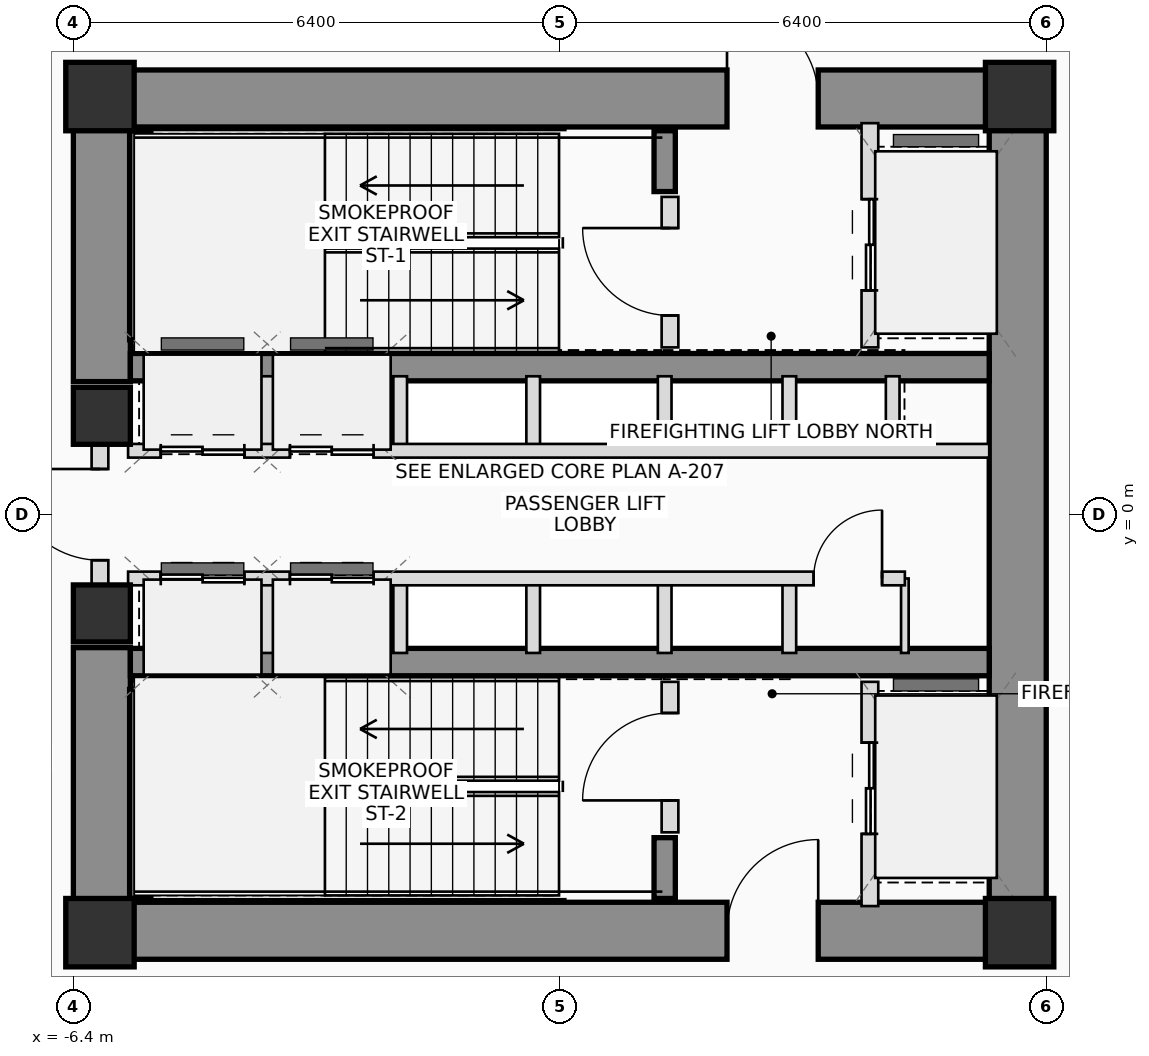
"""IFC4 building model, lengths in metres.
Left out: names, types, materials, properties, quantities, classifications, styles, units other than length and angle.
Written with IfcOpenShell. Run it as: python <this file> out.ifc"""

import sys

from ifc_helpers import new_model, si_unit, direction, frame, frame_2d, origin, origin_2d, place, context, subcontext, project, spatial, rectangle, extrude, source, transform, mapped, element, fill, save


model = new_model("IFC4")
c1 = context("Model", 3, precision=1e-05, world=origin(), true_north=direction((0.0, 1.0)))
c2 = subcontext(c1, "Body", "Model", "MODEL_VIEW")
j1 = project(units=[si_unit("LENGTHUNIT", "METRE"), si_unit("PLANEANGLEUNIT", "RADIAN")], contexts=[c1])
p1 = place(None, origin())
s1 = spatial("IfcSite", under=j1, at=p1, CompositionType="ELEMENT")
p2 = place(p1, origin())
s2 = spatial("IfcBuilding", under=s1, at=p2, CompositionType="ELEMENT")
p3 = place(p2, frame((0.0, 0.0, 73.55)))
s3 = spatial("IfcBuildingStorey", under=s2, at=p3, CompositionType="ELEMENT", Elevation=73.55)
m1 = source(origin(), c2, "Body", "SweptSolid", [
    extrude(rectangle(XDim=0.9, YDim=0.9, at=origin_2d()), origin(), (0.0, 0.0, 1.0), 3.75),
])
for number, where, z_axis, x_axis in (
    (1, (-6.05, -5.5, 0.0), (0.0, 0.0, 1.0), (1.0, 0.0, 0.0)),
    (2, (6.05, -5.5, 0.0), (0.0, 0.0, 1.0), (1.0, 0.0, 0.0)),
    (3, (6.05, 5.5, 0.0), (0.0, 0.0, 1.0), (1.0, 0.0, 0.0)),
    (4, (-6.05, 5.5, 0.0), (0.0, 0.0, 1.0), (1.0, 0.0, 0.0)),
):
    element("IfcColumn", number, at=place(p3, frame(where, z_axis=z_axis, x_axis=x_axis)), inside=s3, PredefinedType="COLUMN", context=c2, shape_type="MappedRepresentation", body=[
        mapped(m1, transform((0.0, 0.0, 0.0), scale=1.0)),
    ])
p4 = place(p3, frame((-6.4, 5.475, 0.0), z_axis=(0.0, 0.0, 1.0), x_axis=(1.0, 0.0, 0.0)))
e5 = element("IfcWall", 5, at=p4, inside=s3, PredefinedType="SHEAR", context=c2, shape_type="SweptSolid", body=[
    extrude(rectangle(XDim=12.8, YDim=0.75, at=frame_2d((6.4, 0.0))), origin(), (0.0, 0.0, 1.0), 3.75),
])
p5 = place(p4, frame((8.6, 0.0, 0.0)))
e6 = element("IfcOpeningElement", 6, at=p5, cuts=e5, PredefinedType="OPENING", context=c2, shape_type="SweptSolid", body=[
    extrude(rectangle(XDim=1.2, YDim=2.2, at=frame_2d((0.6, 1.1))), frame((0.0, 0.385, 0.0), z_axis=(0.0, -1.0, 0.0), x_axis=(1.0, 0.0, 0.0)), (0.0, 0.0, 1.0), 0.77),
])
p6 = place(p3, frame((-6.4, -5.475, 0.0), z_axis=(0.0, 0.0, 1.0), x_axis=(1.0, 0.0, 0.0)))
e7 = element("IfcWall", 7, at=p6, inside=s3, PredefinedType="SHEAR", context=c2, shape_type="SweptSolid", body=[
    extrude(rectangle(XDim=12.8, YDim=0.75, at=frame_2d((6.4, 0.0))), origin(), (0.0, 0.0, 1.0), 3.75),
])
p7 = place(p6, frame((8.6, 0.0, 0.0)))
e8 = element("IfcOpeningElement", 8, at=p7, cuts=e7, PredefinedType="OPENING", context=c2, shape_type="SweptSolid", body=[
    extrude(rectangle(XDim=1.2, YDim=2.2, at=frame_2d((0.6, 1.1))), frame((0.0, 0.385, 0.0), z_axis=(0.0, -1.0, 0.0), x_axis=(1.0, 0.0, 0.0)), (0.0, 0.0, 1.0), 0.77),
])
p8 = place(p3, frame((6.025, -5.1, 0.0), z_axis=(0.0, 0.0, 1.0), x_axis=(0.0, 1.0, 0.0)))
e9 = element("IfcWall", 9, at=p8, inside=s3, PredefinedType="SHEAR", context=c2, shape_type="SweptSolid", body=[
    extrude(rectangle(XDim=10.2, YDim=0.75, at=frame_2d((5.1, 0.0))), origin(), (0.0, 0.0, 1.0), 3.75),
])
for number, where, z_axis, x_axis in (
    (10, (-6.025, -5.1, 0.0), (0.0, 0.0, 1.0), (0.0, 1.0, 0.0)),
    (11, (-6.025, 1.75, 0.0), (0.0, 0.0, 1.0), (0.0, 1.0, 0.0)),
):
    element("IfcWall", number, at=place(p3, frame(where, z_axis=z_axis, x_axis=x_axis)), inside=s3, PredefinedType="SHEAR", context=c2, shape_type="SweptSolid", body=[
        extrude(rectangle(XDim=3.35, YDim=0.75, at=frame_2d((1.675, 0.0))), origin(), (0.0, 0.0, 1.0), 3.75),
    ])
for number, where, z_axis, x_axis in (
    (12, (-5.65, 1.94, 0.0), (0.0, 0.0, 1.0), (1.0, 0.0, 0.0)),
    (13, (-5.65, -1.94, 0.0), (0.0, 0.0, 1.0), (1.0, 0.0, 0.0)),
):
    element("IfcWall", number, at=place(p3, frame(where, z_axis=z_axis, x_axis=x_axis)), inside=s3, PredefinedType="SHEAR", context=c2, shape_type="SweptSolid", body=[
        extrude(rectangle(XDim=11.3, YDim=0.36, at=frame_2d((5.65, 0.0))), origin(), (0.0, 0.0, 1.0), 3.75),
    ])
p9 = place(p3, frame((-5.52, 2.3, 0.0), z_axis=(0.0, 0.0, 1.0), x_axis=(0.0, 1.0, 0.0)))
e14 = element("IfcWall", 14, at=p9, inside=s3, PredefinedType="SHEAR", context=c2, shape_type="SweptSolid", body=[
    extrude(rectangle(XDim=2.75, YDim=0.28, at=frame_2d((1.375, 0.0))), origin(), (0.0, 0.0, 1.0), 3.75),
])
p10 = place(p3, frame((1.38, 4.25, 0.0), z_axis=(0.0, 0.0, 1.0), x_axis=(0.0, 1.0, 0.0)))
e15 = element("IfcWall", 15, at=p10, inside=s3, PredefinedType="SHEAR", context=c2, shape_type="SweptSolid", body=[
    extrude(rectangle(XDim=0.8, YDim=0.28, at=frame_2d((0.4, 0.0))), origin(), (0.0, 0.0, 1.0), 3.75),
])
p11 = place(p3, frame((-5.52, -5.05, 0.0), z_axis=(0.0, 0.0, 1.0), x_axis=(0.0, 1.0, 0.0)))
e16 = element("IfcWall", 16, at=p11, inside=s3, PredefinedType="SHEAR", context=c2, shape_type="SweptSolid", body=[
    extrude(rectangle(XDim=2.75, YDim=0.28, at=frame_2d((1.375, 0.0))), origin(), (0.0, 0.0, 1.0), 3.75),
])
p12 = place(p3, frame((1.38, -5.05, 0.0), z_axis=(0.0, 0.0, 1.0), x_axis=(0.0, 1.0, 0.0)))
e17 = element("IfcWall", 17, at=p12, inside=s3, PredefinedType="SHEAR", context=c2, shape_type="SweptSolid", body=[
    extrude(rectangle(XDim=0.8, YDim=0.28, at=frame_2d((0.4, 0.0))), origin(), (0.0, 0.0, 1.0), 3.75),
])
m2 = source(origin(), c2, "Body", "SweptSolid", [
    extrude(rectangle(XDim=0.75, YDim=0.75, at=origin_2d()), origin(), (0.0, 0.0, 1.0), 3.75),
])
for number, where, z_axis, x_axis in (
    (18, (-6.025, -1.3, 0.0), (0.0, 0.0, 1.0), (1.0, 0.0, 0.0)),
    (19, (-6.025, 1.3, 0.0), (0.0, 0.0, 1.0), (1.0, 0.0, 0.0)),
):
    element("IfcColumn", number, at=place(p3, frame(where, z_axis=z_axis, x_axis=x_axis)), inside=s3, PredefinedType="COLUMN", context=c2, shape_type="MappedRepresentation", body=[
        mapped(m2, transform((0.0, 0.0, 0.0), scale=1.0)),
    ])
p13 = place(p3, frame((-6.05, -0.95, 0.0), z_axis=(0.0, 0.0, 1.0), x_axis=(0.0, 1.0, 0.0)))
e20 = element("IfcWall", 20, at=p13, inside=s3, PredefinedType="PLUMBINGWALL", context=c2, shape_type="SweptSolid", body=[
    extrude(rectangle(XDim=1.9, YDim=0.22, at=frame_2d((0.95, 0.0))), origin(), (0.0, 0.0, 1.0), 2.525),
])
p14 = place(p13, frame((0.35, 0.0, 0.0)))
e21 = element("IfcOpeningElement", 21, at=p14, cuts=e20, PredefinedType="OPENING", context=c2, shape_type="SweptSolid", body=[
    extrude(rectangle(XDim=1.2, YDim=2.2, at=frame_2d((0.6, 1.1))), frame((0.0, 0.12, 0.0), z_axis=(0.0, -1.0, 0.0), x_axis=(1.0, 0.0, 0.0)), (0.0, 0.0, 1.0), 0.24),
])
p15 = place(p3, frame((1.45, 2.2, 0.0), z_axis=(0.0, 0.0, 1.0), x_axis=(0.0, 1.0, 0.0)))
e22 = element("IfcWall", 22, at=p15, inside=s3, PredefinedType="PLUMBINGWALL", context=c2, shape_type="SweptSolid", body=[
    extrude(rectangle(XDim=1.98, YDim=0.22, at=frame_2d((0.99, 0.0))), origin(), (0.0, 0.0, 1.0), 3.545),
])
p16 = place(p15, frame((0.42, 0.0, 0.0)))
e23 = element("IfcOpeningElement", 23, at=p16, cuts=e22, PredefinedType="OPENING", context=c2, shape_type="SweptSolid", body=[
    extrude(rectangle(XDim=1.15, YDim=2.15, at=frame_2d((0.575, 1.075))), frame((0.0, 0.12, 0.0), z_axis=(0.0, -1.0, 0.0), x_axis=(1.0, 0.0, 0.0)), (0.0, 0.0, 1.0), 0.24),
])
p17 = place(p3, frame((4.08, 2.2, 0.0), z_axis=(0.0, 0.0, 1.0), x_axis=(0.0, 1.0, 0.0)))
e24 = element("IfcWall", 24, at=p17, inside=s3, PredefinedType="PLUMBINGWALL", context=c2, shape_type="SweptSolid", body=[
    extrude(rectangle(XDim=2.95, YDim=0.22, at=frame_2d((1.475, 0.0))), origin(), (0.0, 0.0, 1.0), 3.545),
])
p18 = place(p17, frame((0.75, 0.0, 0.0)))
e25 = element("IfcOpeningElement", 25, at=p18, cuts=e24, PredefinedType="OPENING", context=c2, shape_type="SweptSolid", body=[
    extrude(rectangle(XDim=1.2, YDim=2.25, at=frame_2d((0.6, 1.125))), frame((0.0, 0.12, 0.0), z_axis=(0.0, -1.0, 0.0), x_axis=(1.0, 0.0, 0.0)), (0.0, 0.0, 1.0), 0.24),
])
p19 = place(p3, frame((1.45, -4.18, 0.0), z_axis=(0.0, 0.0, 1.0), x_axis=(0.0, 1.0, 0.0)))
e26 = element("IfcWall", 26, at=p19, inside=s3, PredefinedType="PLUMBINGWALL", context=c2, shape_type="SweptSolid", body=[
    extrude(rectangle(XDim=1.98, YDim=0.22, at=frame_2d((0.99, 0.0))), origin(), (0.0, 0.0, 1.0), 3.545),
])
p20 = place(p19, frame((0.42, 0.0, 0.0)))
e27 = element("IfcOpeningElement", 27, at=p20, cuts=e26, PredefinedType="OPENING", context=c2, shape_type="SweptSolid", body=[
    extrude(rectangle(XDim=1.15, YDim=2.15, at=frame_2d((0.575, 1.075))), frame((0.0, 0.12, 0.0), z_axis=(0.0, -1.0, 0.0), x_axis=(1.0, 0.0, 0.0)), (0.0, 0.0, 1.0), 0.24),
])
p21 = place(p3, frame((4.08, -5.15, 0.0), z_axis=(0.0, 0.0, 1.0), x_axis=(0.0, 1.0, 0.0)))
e28 = element("IfcWall", 28, at=p21, inside=s3, PredefinedType="PLUMBINGWALL", context=c2, shape_type="SweptSolid", body=[
    extrude(rectangle(XDim=2.95, YDim=0.22, at=frame_2d((1.475, 0.0))), origin(), (0.0, 0.0, 1.0), 3.545),
])
p22 = place(p21, frame((0.95, 0.0, 0.0)))
e29 = element("IfcOpeningElement", 29, at=p22, cuts=e28, PredefinedType="OPENING", context=c2, shape_type="SweptSolid", body=[
    extrude(rectangle(XDim=1.2, YDim=2.25, at=frame_2d((0.6, 1.125))), frame((0.0, 0.12, 0.0), z_axis=(0.0, -1.0, 0.0), x_axis=(1.0, 0.0, 0.0)), (0.0, 0.0, 1.0), 0.24),
])
for number, where, z_axis, x_axis in (
    (30, (-3.85, 0.84, 0.0), (0.0, 0.0, 1.0), (0.0, 1.0, 0.0)),
    (31, (-3.85, -1.82, 0.0), (0.0, 0.0, 1.0), (0.0, 1.0, 0.0)),
    (32, (-2.1, 0.84, 0.0), (0.0, 0.0, 1.0), (0.0, 1.0, 0.0)),
    (33, (-2.1, -1.82, 0.0), (0.0, 0.0, 1.0), (0.0, 1.0, 0.0)),
    (34, (-0.35, 0.84, 0.0), (0.0, 0.0, 1.0), (0.0, 1.0, 0.0)),
    (35, (-0.35, -1.82, 0.0), (0.0, 0.0, 1.0), (0.0, 1.0, 0.0)),
    (36, (1.38, 0.84, 0.0), (0.0, 0.0, 1.0), (0.0, 1.0, 0.0)),
    (37, (1.38, -1.82, 0.0), (0.0, 0.0, 1.0), (0.0, 1.0, 0.0)),
    (38, (3.02, 0.84, 0.0), (0.0, 0.0, 1.0), (0.0, 1.0, 0.0)),
    (39, (4.38, 0.84, 0.0), (0.0, 0.0, 1.0), (0.0, 1.0, 0.0)),
    (40, (3.02, -1.82, 0.0), (0.0, 0.0, 1.0), (0.0, 1.0, 0.0)),
):
    element("IfcWall", number, at=place(p3, frame(where, z_axis=z_axis, x_axis=x_axis)), inside=s3, PredefinedType="PLUMBINGWALL", context=c2, shape_type="SweptSolid", body=[
        extrude(rectangle(XDim=0.98, YDim=0.18, at=frame_2d((0.49, 0.0))), origin(), (0.0, 0.0, 1.0), 3.545),
    ])
p23 = place(p3, frame((4.54, -1.82, 0.0), z_axis=(0.0, 0.0, 1.0), x_axis=(0.0, 1.0, 0.0)))
e41 = element("IfcWall", 41, at=p23, inside=s3, PredefinedType="PARTITIONING", context=c2, shape_type="SweptSolid", body=[
    extrude(rectangle(XDim=0.98, YDim=0.1, at=frame_2d((0.49, 0.0))), origin(), (0.0, 0.0, 1.0), 3.545),
])
p24 = place(p3, frame((-5.68, 0.84, 0.0), z_axis=(0.0, 0.0, 1.0), x_axis=(1.0, 0.0, 0.0)))
e42 = element("IfcWall", 42, at=p24, inside=s3, PredefinedType="PLUMBINGWALL", context=c2, shape_type="SweptSolid", body=[
    extrude(rectangle(XDim=11.33, YDim=0.18, at=frame_2d((5.665, 0.0))), origin(), (0.0, 0.0, 1.0), 3.545),
])
p25 = place(p24, frame((0.43, 0.0, 0.0)))
e43 = element("IfcOpeningElement", 43, at=p25, cuts=e42, PredefinedType="OPENING", context=c2, shape_type="SweptSolid", body=[
    extrude(rectangle(XDim=1.1, YDim=2.2, at=frame_2d((0.55, 1.1))), frame((0.0, 0.1, 0.0), z_axis=(0.0, -1.0, 0.0), x_axis=(1.0, 0.0, 0.0)), (0.0, 0.0, 1.0), 0.2),
])
p26 = place(p24, frame((2.13, 0.0, 0.0)))
e44 = element("IfcOpeningElement", 44, at=p26, cuts=e42, PredefinedType="OPENING", context=c2, shape_type="SweptSolid", body=[
    extrude(rectangle(XDim=1.1, YDim=2.2, at=frame_2d((0.55, 1.1))), frame((0.0, 0.1, 0.0), z_axis=(0.0, -1.0, 0.0), x_axis=(1.0, 0.0, 0.0)), (0.0, 0.0, 1.0), 0.2),
])
p27 = place(p3, frame((-5.68, -0.84, 0.0), z_axis=(0.0, 0.0, 1.0), x_axis=(1.0, 0.0, 0.0)))
e45 = element("IfcWall", 45, at=p27, inside=s3, PredefinedType="PLUMBINGWALL", context=c2, shape_type="SweptSolid", body=[
    extrude(rectangle(XDim=10.22, YDim=0.18, at=frame_2d((5.11, 0.0))), origin(), (0.0, 0.0, 1.0), 3.545),
])
p28 = place(p27, frame((0.43, 0.0, 0.0)))
e46 = element("IfcOpeningElement", 46, at=p28, cuts=e45, PredefinedType="OPENING", context=c2, shape_type="SweptSolid", body=[
    extrude(rectangle(XDim=1.1, YDim=2.2, at=frame_2d((0.55, 1.1))), frame((0.0, 0.1, 0.0), z_axis=(0.0, -1.0, 0.0), x_axis=(1.0, 0.0, 0.0)), (0.0, 0.0, 1.0), 0.2),
])
p29 = place(p27, frame((2.13, 0.0, 0.0)))
e47 = element("IfcOpeningElement", 47, at=p29, cuts=e45, PredefinedType="OPENING", context=c2, shape_type="SweptSolid", body=[
    extrude(rectangle(XDim=1.1, YDim=2.2, at=frame_2d((0.55, 1.1))), frame((0.0, 0.1, 0.0), z_axis=(0.0, -1.0, 0.0), x_axis=(1.0, 0.0, 0.0)), (0.0, 0.0, 1.0), 0.2),
])
p30 = place(p27, frame((9.02, 0.0, 0.0)))
e48 = element("IfcOpeningElement", 48, at=p30, cuts=e45, PredefinedType="OPENING", context=c2, shape_type="SweptSolid", body=[
    extrude(rectangle(XDim=0.9, YDim=2.05, at=frame_2d((0.45, 1.025))), frame((0.0, 0.1, 0.0), z_axis=(0.0, -1.0, 0.0), x_axis=(1.0, 0.0, 0.0)), (0.0, 0.0, 1.0), 0.2),
])
p31 = place(p5, origin())
e49 = element("IfcDoor", 49, at=p31, inside=s3, OperationType="SINGLE_SWING_LEFT", PredefinedType="DOOR", context=c2, shape_type="SweptSolid", body=[
    extrude(rectangle(XDim=1.2, YDim=2.2, at=frame_2d((0.6, 1.1))), frame((0.0, 0.025, 0.0), z_axis=(0.0, -1.0, 0.0), x_axis=(1.0, 0.0, 0.0)), (0.0, 0.0, 1.0), 0.05),
])
fill(e6, e49)
p32 = place(p7, origin())
e50 = element("IfcDoor", 50, at=p32, inside=s3, OperationType="SINGLE_SWING_RIGHT", PredefinedType="DOOR", context=c2, shape_type="SweptSolid", body=[
    extrude(rectangle(XDim=1.2, YDim=2.2, at=frame_2d((0.6, 1.1))), frame((0.0, 0.025, 0.0), z_axis=(0.0, -1.0, 0.0), x_axis=(1.0, 0.0, 0.0)), (0.0, 0.0, 1.0), 0.05),
])
fill(e8, e50)
p33 = place(p14, origin())
e51 = element("IfcDoor", 51, at=p33, inside=s3, OperationType="SINGLE_SWING_RIGHT", PredefinedType="DOOR", context=c2, shape_type="SweptSolid", body=[
    extrude(rectangle(XDim=1.2, YDim=2.2, at=frame_2d((0.6, 1.1))), frame((0.0, 0.025, 0.0), z_axis=(0.0, -1.0, 0.0), x_axis=(1.0, 0.0, 0.0)), (0.0, 0.0, 1.0), 0.05),
])
fill(e21, e51)
p34 = place(p16, origin())
e52 = element("IfcDoor", 52, at=p34, inside=s3, OperationType="SINGLE_SWING_RIGHT", PredefinedType="DOOR", context=c2, shape_type="SweptSolid", body=[
    extrude(rectangle(XDim=1.15, YDim=2.15, at=frame_2d((0.575, 1.075))), frame((0.0, 0.025, 0.0), z_axis=(0.0, -1.0, 0.0), x_axis=(1.0, 0.0, 0.0)), (0.0, 0.0, 1.0), 0.05),
])
fill(e23, e52)
p35 = place(p18, origin())
e53 = element("IfcDoor", 53, at=p35, inside=s3, OperationType="DOUBLE_DOOR_SLIDING", PredefinedType="DOOR", context=c2, shape_type="SweptSolid", body=[
    extrude(rectangle(XDim=1.2, YDim=2.25, at=frame_2d((0.6, 1.125))), frame((0.0, 0.025, 0.0), z_axis=(0.0, -1.0, 0.0), x_axis=(1.0, 0.0, 0.0)), (0.0, 0.0, 1.0), 0.05),
])
fill(e25, e53)
p36 = place(p20, origin())
e54 = element("IfcDoor", 54, at=p36, inside=s3, OperationType="SINGLE_SWING_LEFT", PredefinedType="DOOR", context=c2, shape_type="SweptSolid", body=[
    extrude(rectangle(XDim=1.15, YDim=2.15, at=frame_2d((0.575, 1.075))), frame((0.0, 0.025, 0.0), z_axis=(0.0, -1.0, 0.0), x_axis=(1.0, 0.0, 0.0)), (0.0, 0.0, 1.0), 0.05),
])
fill(e27, e54)
p37 = place(p22, origin())
e55 = element("IfcDoor", 55, at=p37, inside=s3, OperationType="DOUBLE_DOOR_SLIDING", PredefinedType="DOOR", context=c2, shape_type="SweptSolid", body=[
    extrude(rectangle(XDim=1.2, YDim=2.25, at=frame_2d((0.6, 1.125))), frame((0.0, 0.025, 0.0), z_axis=(0.0, -1.0, 0.0), x_axis=(1.0, 0.0, 0.0)), (0.0, 0.0, 1.0), 0.05),
])
fill(e29, e55)
p38 = place(p25, origin())
e56 = element("IfcDoor", 56, at=p38, inside=s3, OperationType="DOUBLE_DOOR_SLIDING", PredefinedType="DOOR", context=c2, shape_type="SweptSolid", body=[
    extrude(rectangle(XDim=1.1, YDim=2.2, at=frame_2d((0.55, 1.1))), frame((0.0, 0.025, 0.0), z_axis=(0.0, -1.0, 0.0), x_axis=(1.0, 0.0, 0.0)), (0.0, 0.0, 1.0), 0.05),
])
fill(e43, e56)
p39 = place(p26, origin())
e57 = element("IfcDoor", 57, at=p39, inside=s3, OperationType="DOUBLE_DOOR_SLIDING", PredefinedType="DOOR", context=c2, shape_type="SweptSolid", body=[
    extrude(rectangle(XDim=1.1, YDim=2.2, at=frame_2d((0.55, 1.1))), frame((0.0, 0.025, 0.0), z_axis=(0.0, -1.0, 0.0), x_axis=(1.0, 0.0, 0.0)), (0.0, 0.0, 1.0), 0.05),
])
fill(e44, e57)
p40 = place(p28, origin())
e58 = element("IfcDoor", 58, at=p40, inside=s3, OperationType="DOUBLE_DOOR_SLIDING", PredefinedType="DOOR", context=c2, shape_type="SweptSolid", body=[
    extrude(rectangle(XDim=1.1, YDim=2.2, at=frame_2d((0.55, 1.1))), frame((0.0, 0.025, 0.0), z_axis=(0.0, -1.0, 0.0), x_axis=(1.0, 0.0, 0.0)), (0.0, 0.0, 1.0), 0.05),
])
fill(e46, e58)
p41 = place(p29, origin())
e59 = element("IfcDoor", 59, at=p41, inside=s3, OperationType="DOUBLE_DOOR_SLIDING", PredefinedType="DOOR", context=c2, shape_type="SweptSolid", body=[
    extrude(rectangle(XDim=1.1, YDim=2.2, at=frame_2d((0.55, 1.1))), frame((0.0, 0.025, 0.0), z_axis=(0.0, -1.0, 0.0), x_axis=(1.0, 0.0, 0.0)), (0.0, 0.0, 1.0), 0.05),
])
fill(e47, e59)
p42 = place(p30, origin())
e60 = element("IfcDoor", 60, at=p42, inside=s3, OperationType="SINGLE_SWING_RIGHT", PredefinedType="DOOR", context=c2, shape_type="SweptSolid", body=[
    extrude(rectangle(XDim=0.9, YDim=2.05, at=frame_2d((0.45, 1.025))), frame((0.0, 0.025, 0.0), z_axis=(0.0, -1.0, 0.0), x_axis=(1.0, 0.0, 0.0)), (0.0, 0.0, 1.0), 0.05),
])
fill(e48, e60)
save(model, sys.argv[1])
